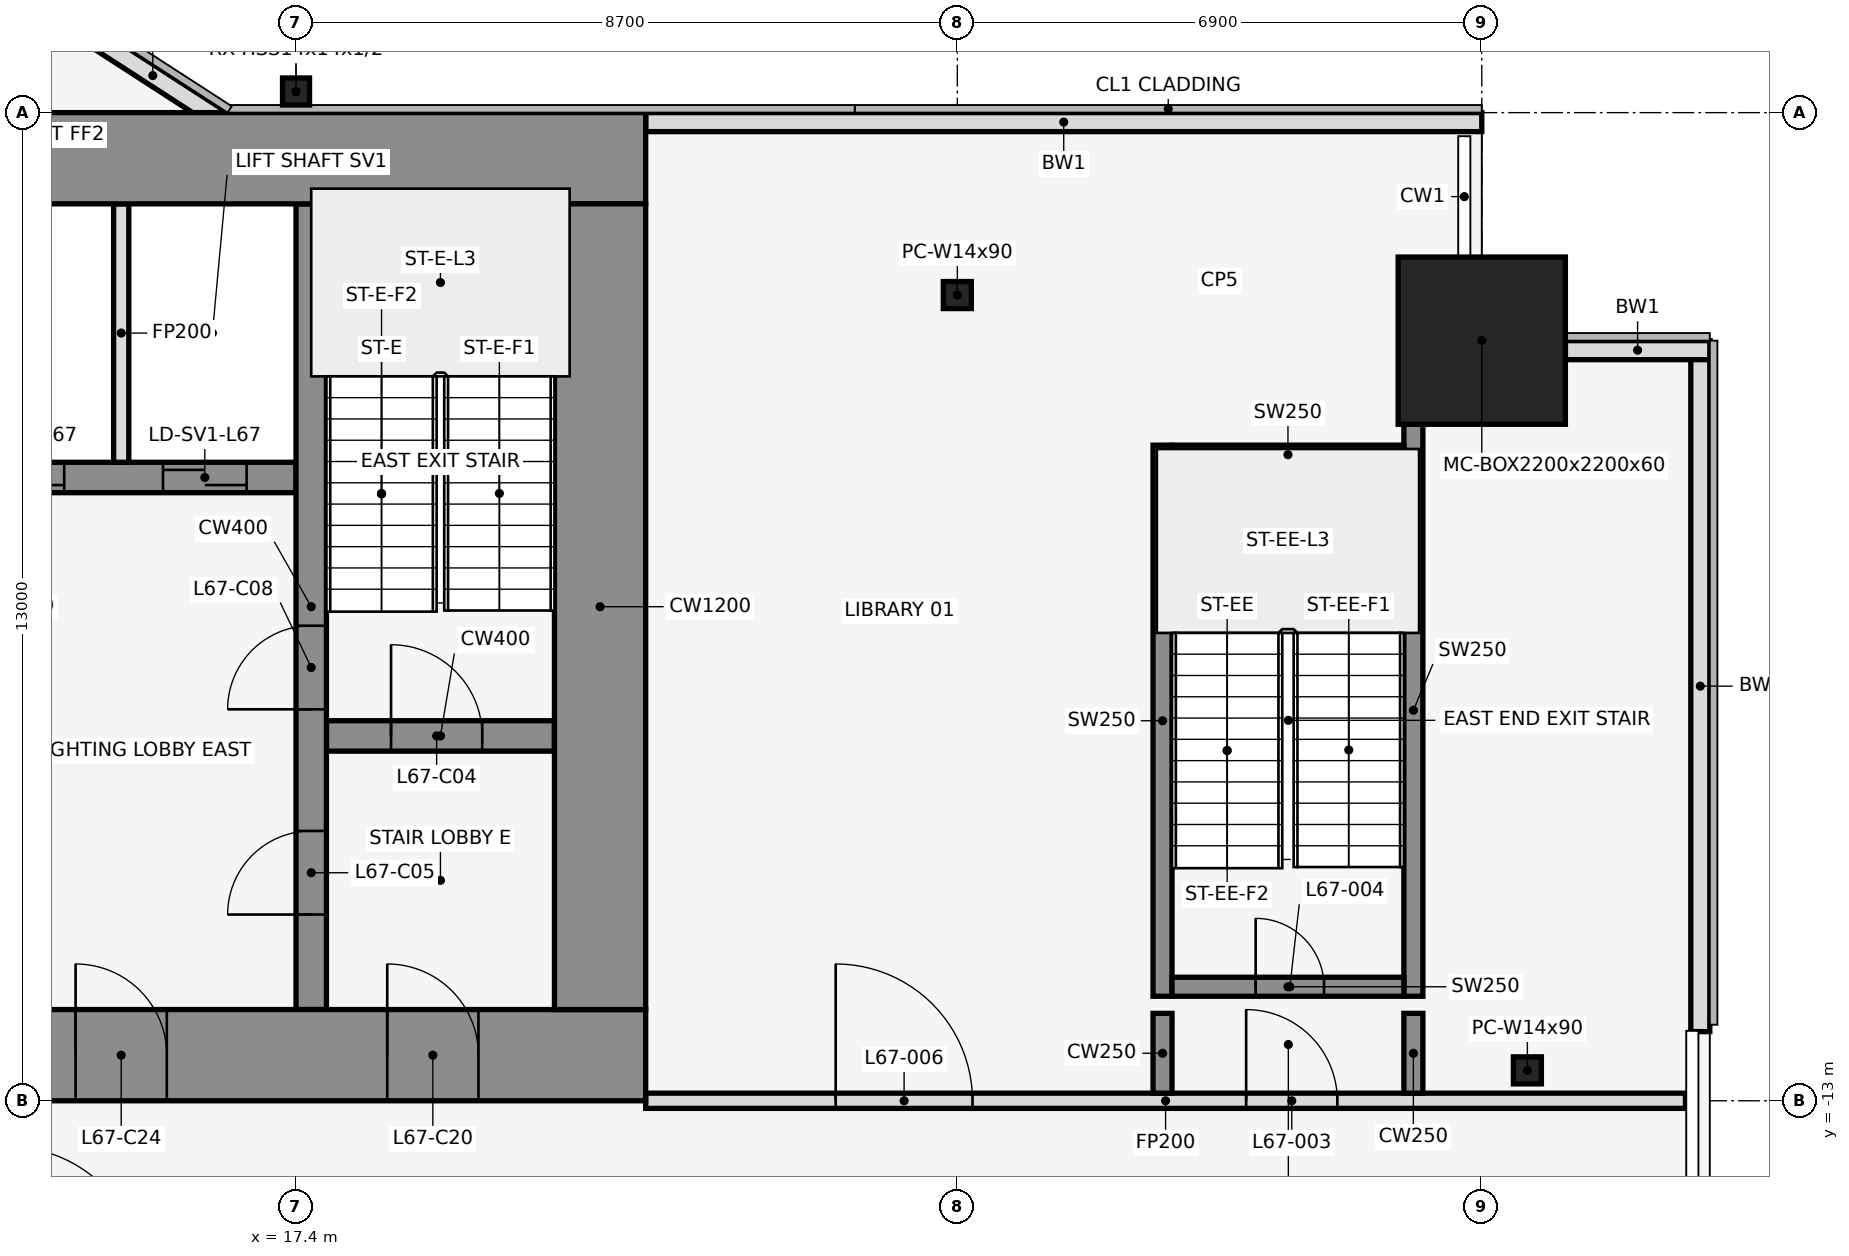
"""IFC4 building model, lengths in metres.
Left out: names, types, materials, properties, quantities, classifications, styles, units other than length and angle.
Written with IfcOpenShell. Run it as: python <this file> out.ifc"""

import sys

from ifc_helpers import new_model, si_unit, direction, frame, frame_2d, origin, origin_2d, place, context, subcontext, project, spatial, rectangle, hollow_rectangle, i_section, extrude, element, fill, save


model = new_model("IFC4")
c1 = context("Model", 3, precision=1e-05, world=origin(), true_north=direction((0.0, 1.0)))
c2 = subcontext(c1, "Body", "Model", "MODEL_VIEW")
j1 = project(units=[si_unit("LENGTHUNIT", "METRE"), si_unit("PLANEANGLEUNIT", "RADIAN")], contexts=[c1])
p1 = place(None, origin())
s1 = spatial("IfcSite", under=j1, at=p1, CompositionType="ELEMENT")
p2 = place(p1, origin())
s2 = spatial("IfcBuilding", under=s1, at=p2, CompositionType="ELEMENT")
p3 = place(p2, frame((0.0, 0.0, 297.5)))
s3 = spatial("IfcBuildingStorey", under=s2, at=p3, CompositionType="ELEMENT", Elevation=297.5)
p4 = place(p3, frame((26.1, -2.4, 0.0), z_axis=(0.0, 0.0, 1.0), x_axis=(1.0, 0.0, 0.0)))
e1 = element("IfcColumn", 1, at=p4, inside=s3, PredefinedType="COLUMN", context=c2, shape_type="SweptSolid", body=[
    extrude(i_section(OverallWidth=0.368, OverallDepth=0.356, WebThickness=0.011, FlangeThickness=0.018, at=origin_2d()), origin(), (0.0, 0.0, 1.0), 4.5),
])
p5 = place(p3, frame((33.0, -3.0, 0.0), z_axis=(0.0, 0.0, 1.0), x_axis=(1.0, 0.0, 0.0)))
e2 = element("IfcColumn", 2, at=p5, inside=s3, PredefinedType="COLUMN", context=c2, shape_type="SweptSolid", body=[
    extrude(hollow_rectangle(XDim=2.2, YDim=2.2, WallThickness=0.06, at=origin_2d()), origin(), (0.0, 0.0, 1.0), 4.5),
])
p6 = place(p3, frame((17.4, 0.278, 0.0), z_axis=(0.0, 0.0, 1.0), x_axis=(1.0, 0.0, 0.0)))
e3 = element("IfcColumn", 3, at=p6, inside=s3, PredefinedType="COLUMN", context=c2, shape_type="SweptSolid", body=[
    extrude(hollow_rectangle(XDim=0.356, YDim=0.356, WallThickness=0.012, at=origin_2d()), origin(), (0.0, 0.0, 1.0), 4.5),
])
p7 = place(p3, frame((33.6, -12.6, 0.0), z_axis=(0.0, 0.0, 1.0), x_axis=(1.0, 0.0, 0.0)))
e4 = element("IfcColumn", 4, at=p7, inside=s3, PredefinedType="COLUMN", context=c2, shape_type="SweptSolid", body=[
    extrude(i_section(OverallWidth=0.368, OverallDepth=0.356, WebThickness=0.011, FlangeThickness=0.018, at=origin_2d()), origin(), (0.0, 0.0, 1.0), 4.5),
])
p8 = place(p3, frame((33.0, -0.125, 0.0), z_axis=(0.0, 0.0, 1.0), x_axis=(-1.0, 0.0, 0.0)))
e5 = element("IfcWall", 5, at=p8, inside=s3, PredefinedType="STANDARD", context=c2, shape_type="SweptSolid", body=[
    extrude(rectangle(XDim=11.0, YDim=0.25, at=frame_2d((5.5, 0.0))), origin(), (0.0, 0.0, 1.0), 4.35),
])
p9 = place(p3, frame((16.432, -0.105, 0.0), z_axis=(0.0, 0.0, 1.0), x_axis=(-0.83981312244, 0.542875602121, 0.0)))
e6 = element("IfcWall", 6, at=p9, inside=s3, PredefinedType="STANDARD", context=c2, shape_type="SweptSolid", body=[
    extrude(rectangle(XDim=2.183, YDim=0.25, at=frame_2d((1.091, 0.0))), origin(), (0.0, 0.0, 1.0), 4.35),
])
p10 = place(p3, frame((35.875, -12.09, 0.0), z_axis=(0.0, 0.0, 1.0), x_axis=(0.0, 1.0, 0.0)))
e7 = element("IfcWall", 7, at=p10, inside=s3, PredefinedType="STANDARD", context=c2, shape_type="SweptSolid", body=[
    extrude(rectangle(XDim=9.09, YDim=0.25, at=frame_2d((4.545, 0.0))), origin(), (0.0, 0.0, 1.0), 4.35),
])
p11 = place(p3, frame((36.0, -3.125, 0.0), z_axis=(0.0, 0.0, 1.0), x_axis=(-1.0, 0.0, 0.0)))
e8 = element("IfcWall", 8, at=p11, inside=s3, PredefinedType="STANDARD", context=c2, shape_type="SweptSolid", body=[
    extrude(rectangle(XDim=1.9, YDim=0.25, at=frame_2d((0.95, 0.0))), origin(), (0.0, 0.0, 1.0), 4.35),
])
p12 = place(p3, frame((28.8, -11.625, 0.0), z_axis=(0.0, 0.0, 1.0), x_axis=(0.0, 1.0, 0.0)))
e9 = element("IfcWall", 9, at=p12, inside=s3, PredefinedType="SHEAR", context=c2, shape_type="SweptSolid", body=[
    extrude(rectangle(XDim=7.25, YDim=0.25, at=frame_2d((3.625, 0.0))), origin(), (0.0, 0.0, 1.0), 4.5),
])
p13 = place(p3, frame((32.1, -11.625, 0.0), z_axis=(0.0, 0.0, 1.0), x_axis=(0.0, 1.0, 0.0)))
e10 = element("IfcWall", 10, at=p13, inside=s3, PredefinedType="SHEAR", context=c2, shape_type="SweptSolid", body=[
    extrude(rectangle(XDim=7.525, YDim=0.25, at=frame_2d((3.762, 0.0))), origin(), (0.0, 0.0, 1.0), 4.5),
])
p14 = place(p3, frame((28.925, -11.5, 0.0), z_axis=(0.0, 0.0, 1.0), x_axis=(1.0, 0.0, 0.0)))
e11 = element("IfcWall", 11, at=p14, inside=s3, PredefinedType="SHEAR", context=c2, shape_type="SweptSolid", body=[
    extrude(rectangle(XDim=3.05, YDim=0.25, at=frame_2d((1.525, 0.0))), origin(), (0.0, 0.0, 1.0), 4.5),
])
p15 = place(p14, frame((1.1, 0.0, 0.0)))
e12 = element("IfcOpeningElement", 12, at=p15, cuts=e11, PredefinedType="OPENING", context=c2, shape_type="SweptSolid", body=[
    extrude(rectangle(XDim=0.9, YDim=2.1, at=frame_2d((0.45, 1.05))), frame((0.0, 0.137, 0.0), z_axis=(0.0, -1.0, 0.0), x_axis=(1.0, 0.0, 0.0)), (0.0, 0.0, 1.0), 0.274),
])
p16 = place(p3, frame((28.925, -4.5, 0.0), z_axis=(0.0, 0.0, 1.0), x_axis=(1.0, 0.0, 0.0)))
e13 = element("IfcWall", 13, at=p16, inside=s3, PredefinedType="SHEAR", context=c2, shape_type="SweptSolid", body=[
    extrude(rectangle(XDim=3.05, YDim=0.25, at=frame_2d((1.525, 0.0))), origin(), (0.0, 0.0, 1.0), 4.5),
])
p17 = place(p3, frame((22.0, -13.0, 0.0), z_axis=(0.0, 0.0, 1.0), x_axis=(1.0, 0.0, 0.0)))
e14 = element("IfcWall", 14, at=p17, inside=s3, PredefinedType="PARTITIONING", context=c2, shape_type="SweptSolid", body=[
    extrude(rectangle(XDim=13.68, YDim=0.2, at=frame_2d((6.84, 0.0))), origin(), (0.0, 0.0, 1.0), 3.418),
])
p18 = place(p17, frame((7.9, 0.0, 0.0)))
e15 = element("IfcOpeningElement", 15, at=p18, cuts=e14, PredefinedType="OPENING", context=c2, shape_type="SweptSolid", body=[
    extrude(rectangle(XDim=1.2, YDim=2.1, at=frame_2d((0.6, 1.05))), frame((0.0, 0.112, 0.0), z_axis=(0.0, -1.0, 0.0), x_axis=(1.0, 0.0, 0.0)), (0.0, 0.0, 1.0), 0.224),
])
p19 = place(p17, frame((2.5, 0.0, 0.0)))
e16 = element("IfcOpeningElement", 16, at=p19, cuts=e14, PredefinedType="OPENING", context=c2, shape_type="SweptSolid", body=[
    extrude(rectangle(XDim=1.8, YDim=2.1, at=frame_2d((0.9, 1.05))), frame((0.0, 0.112, 0.0), z_axis=(0.0, -1.0, 0.0), x_axis=(1.0, 0.0, 0.0)), (0.0, 0.0, 1.0), 0.224),
])
for number, where, z_axis, x_axis in (
    (17, (28.8, -12.9, 0.0), (0.0, 0.0, 1.0), (0.0, 1.0, 0.0)),
    (18, (32.1, -12.9, 0.0), (0.0, 0.0, 1.0), (0.0, 1.0, 0.0)),
):
    element("IfcWall", number, at=place(p3, frame(where, z_axis=z_axis, x_axis=x_axis)), inside=s3, PredefinedType="SHEAR", context=c2, shape_type="SweptSolid", body=[
        extrude(rectangle(XDim=1.05, YDim=0.25, at=frame_2d((0.525, 0.0))), origin(), (0.0, 0.0, 1.0), 4.5),
    ])
p20 = place(p3, frame((17.8, -8.2, 0.0), z_axis=(0.0, 0.0, 1.0), x_axis=(1.0, 0.0, 0.0)))
e19 = element("IfcWall", 19, at=p20, inside=s3, PredefinedType="SHEAR", context=c2, shape_type="SweptSolid", body=[
    extrude(rectangle(XDim=3.0, YDim=0.4, at=frame_2d((1.5, 0.0))), origin(), (0.0, 0.0, 1.0), 4.5),
])
p21 = place(p20, frame((0.85, 0.0, 0.0)))
e20 = element("IfcOpeningElement", 20, at=p21, cuts=e19, PredefinedType="OPENING", context=c2, shape_type="SweptSolid", body=[
    extrude(rectangle(XDim=1.2, YDim=2.1, at=frame_2d((0.6, 1.05))), frame((0.0, 0.212, 0.0), z_axis=(0.0, -1.0, 0.0), x_axis=(1.0, 0.0, 0.0)), (0.0, 0.0, 1.0), 0.424),
])
p22 = place(p3, frame((3.8, -4.8, 0.0), z_axis=(0.0, 0.0, 1.0), x_axis=(1.0, 0.0, 0.0)))
e21 = element("IfcWall", 21, at=p22, inside=s3, PredefinedType="SHEAR", context=c2, shape_type="SweptSolid", body=[
    extrude(rectangle(XDim=13.6, YDim=0.4, at=frame_2d((6.8, 0.0))), origin(), (0.0, 0.0, 1.0), 4.5),
])
p23 = place(p22, frame((0.75, 0.0, 0.0)))
e22 = element("IfcOpeningElement", 22, at=p23, cuts=e21, PredefinedType="OPENING", context=c2, shape_type="SweptSolid", body=[
    extrude(rectangle(XDim=1.2, YDim=2.1, at=frame_2d((0.6, 1.05))), frame((0.0, 0.212, 0.0), z_axis=(0.0, -1.0, 0.0), x_axis=(1.0, 0.0, 0.0)), (0.0, 0.0, 1.0), 0.424),
])
p24 = place(p22, frame((3.65, 0.0, 0.0)))
e23 = element("IfcOpeningElement", 23, at=p24, cuts=e21, PredefinedType="OPENING", context=c2, shape_type="SweptSolid", body=[
    extrude(rectangle(XDim=1.2, YDim=2.1, at=frame_2d((0.6, 1.05))), frame((0.0, 0.212, 0.0), z_axis=(0.0, -1.0, 0.0), x_axis=(1.0, 0.0, 0.0)), (0.0, 0.0, 1.0), 0.424),
])
p25 = place(p22, frame((6.65, 0.0, 0.0)))
e24 = element("IfcOpeningElement", 24, at=p25, cuts=e21, PredefinedType="OPENING", context=c2, shape_type="SweptSolid", body=[
    extrude(rectangle(XDim=1.2, YDim=2.1, at=frame_2d((0.6, 1.05))), frame((0.0, 0.212, 0.0), z_axis=(0.0, -1.0, 0.0), x_axis=(1.0, 0.0, 0.0)), (0.0, 0.0, 1.0), 0.424),
])
p26 = place(p22, frame((9.45, 0.0, 0.0)))
e25 = element("IfcOpeningElement", 25, at=p26, cuts=e21, PredefinedType="OPENING", context=c2, shape_type="SweptSolid", body=[
    extrude(rectangle(XDim=1.1, YDim=2.1, at=frame_2d((0.55, 1.05))), frame((0.0, 0.212, 0.0), z_axis=(0.0, -1.0, 0.0), x_axis=(1.0, 0.0, 0.0)), (0.0, 0.0, 1.0), 0.424),
])
p27 = place(p22, frame((11.85, 0.0, 0.0)))
e26 = element("IfcOpeningElement", 26, at=p27, cuts=e21, PredefinedType="OPENING", context=c2, shape_type="SweptSolid", body=[
    extrude(rectangle(XDim=1.1, YDim=2.1, at=frame_2d((0.55, 1.05))), frame((0.0, 0.212, 0.0), z_axis=(0.0, -1.0, 0.0), x_axis=(1.0, 0.0, 0.0)), (0.0, 0.0, 1.0), 0.424),
])
p28 = place(p3, frame((15.1, -4.6, 0.0), z_axis=(0.0, 0.0, 1.0), x_axis=(0.0, 1.0, 0.0)))
e27 = element("IfcWall", 27, at=p28, inside=s3, PredefinedType="PARTITIONING", context=c2, shape_type="SweptSolid", body=[
    extrude(rectangle(XDim=3.4, YDim=0.2, at=frame_2d((1.7, 0.0))), origin(), (0.0, 0.0, 1.0), 3.418),
])
p29 = place(p3, frame((17.6, -11.8, 0.0), z_axis=(0.0, 0.0, 1.0), x_axis=(0.0, 1.0, 0.0)))
e28 = element("IfcWall", 28, at=p29, inside=s3, PredefinedType="SHEAR", context=c2, shape_type="SweptSolid", body=[
    extrude(rectangle(XDim=10.6, YDim=0.4, at=frame_2d((5.3, 0.0))), origin(), (0.0, 0.0, 1.0), 4.5),
])
p30 = place(p29, frame((1.25, 0.0, 0.0)))
e29 = element("IfcOpeningElement", 29, at=p30, cuts=e28, PredefinedType="OPENING", context=c2, shape_type="SweptSolid", body=[
    extrude(rectangle(XDim=1.1, YDim=2.1, at=frame_2d((0.55, 1.05))), frame((0.0, 0.212, 0.0), z_axis=(0.0, -1.0, 0.0), x_axis=(1.0, 0.0, 0.0)), (0.0, 0.0, 1.0), 0.424),
])
p31 = place(p29, frame((3.95, 0.0, 0.0)))
e30 = element("IfcOpeningElement", 30, at=p31, cuts=e28, PredefinedType="OPENING", context=c2, shape_type="SweptSolid", body=[
    extrude(rectangle(XDim=1.1, YDim=2.1, at=frame_2d((0.55, 1.05))), frame((0.0, 0.212, 0.0), z_axis=(0.0, -1.0, 0.0), x_axis=(1.0, 0.0, 0.0)), (0.0, 0.0, 1.0), 0.424),
])
p32 = place(p3, frame((-22.0, -0.6, 0.0), z_axis=(0.0, 0.0, 1.0), x_axis=(1.0, 0.0, 0.0)))
e31 = element("IfcWall", 31, at=p32, inside=s3, PredefinedType="SHEAR", context=c2, shape_type="SweptSolid", body=[
    extrude(rectangle(XDim=44.0, YDim=1.2, at=frame_2d((22.0, 0.0))), origin(), (0.0, 0.0, 1.0), 4.5),
])
p33 = place(p32, frame((18.55, 0.0, 0.0)))
e32 = element("IfcOpeningElement", 32, at=p33, cuts=e31, PredefinedType="OPENING", context=c2, shape_type="SweptSolid", body=[
    extrude(rectangle(XDim=0.9, YDim=2.1, at=frame_2d((0.45, 1.05))), frame((0.0, 0.612, 0.0), z_axis=(0.0, -1.0, 0.0), x_axis=(1.0, 0.0, 0.0)), (0.0, 0.0, 1.0), 1.224),
])
p34 = place(p32, frame((24.55, 0.0, 0.0)))
e33 = element("IfcOpeningElement", 33, at=p34, cuts=e31, PredefinedType="OPENING", context=c2, shape_type="SweptSolid", body=[
    extrude(rectangle(XDim=0.9, YDim=2.1, at=frame_2d((0.45, 1.05))), frame((0.0, 0.612, 0.0), z_axis=(0.0, -1.0, 0.0), x_axis=(1.0, 0.0, 0.0)), (0.0, 0.0, 1.0), 1.224),
])
p35 = place(p3, frame((-22.0, -12.4, 0.0), z_axis=(0.0, 0.0, 1.0), x_axis=(1.0, 0.0, 0.0)))
e34 = element("IfcWall", 34, at=p35, inside=s3, PredefinedType="SHEAR", context=c2, shape_type="SweptSolid", body=[
    extrude(rectangle(XDim=44.0, YDim=1.2, at=frame_2d((22.0, 0.0))), origin(), (0.0, 0.0, 1.0), 4.5),
])
p36 = place(p35, frame((2.2, 0.0, 0.0)))
e35 = element("IfcOpeningElement", 35, at=p36, cuts=e34, PredefinedType="OPENING", context=c2, shape_type="SweptSolid", body=[
    extrude(rectangle(XDim=1.2, YDim=2.1, at=frame_2d((0.6, 1.05))), frame((0.0, 0.612, 0.0), z_axis=(0.0, -1.0, 0.0), x_axis=(1.0, 0.0, 0.0)), (0.0, 0.0, 1.0), 1.224),
])
p37 = place(p35, frame((21.4, 0.0, 0.0)))
e36 = element("IfcOpeningElement", 36, at=p37, cuts=e34, PredefinedType="OPENING", context=c2, shape_type="SweptSolid", body=[
    extrude(rectangle(XDim=1.2, YDim=2.1, at=frame_2d((0.6, 1.05))), frame((0.0, 0.612, 0.0), z_axis=(0.0, -1.0, 0.0), x_axis=(1.0, 0.0, 0.0)), (0.0, 0.0, 1.0), 1.224),
])
p38 = place(p35, frame((40.6, 0.0, 0.0)))
e37 = element("IfcOpeningElement", 37, at=p38, cuts=e34, PredefinedType="OPENING", context=c2, shape_type="SweptSolid", body=[
    extrude(rectangle(XDim=1.2, YDim=2.1, at=frame_2d((0.6, 1.05))), frame((0.0, 0.612, 0.0), z_axis=(0.0, -1.0, 0.0), x_axis=(1.0, 0.0, 0.0)), (0.0, 0.0, 1.0), 1.224),
])
p39 = place(p35, frame((16.0, 0.0, 0.0)))
e38 = element("IfcOpeningElement", 38, at=p39, cuts=e34, PredefinedType="OPENING", context=c2, shape_type="SweptSolid", body=[
    extrude(rectangle(XDim=1.8, YDim=2.1, at=frame_2d((0.9, 1.05))), frame((0.0, 0.612, 0.0), z_axis=(0.0, -1.0, 0.0), x_axis=(1.0, 0.0, 0.0)), (0.0, 0.0, 1.0), 1.224),
])
p40 = place(p35, frame((6.3, 0.0, 0.0)))
e39 = element("IfcOpeningElement", 39, at=p40, cuts=e34, PredefinedType="OPENING", context=c2, shape_type="SweptSolid", body=[
    extrude(rectangle(XDim=1.2, YDim=2.1, at=frame_2d((0.6, 1.05))), frame((0.0, 0.612, 0.0), z_axis=(0.0, -1.0, 0.0), x_axis=(1.0, 0.0, 0.0)), (0.0, 0.0, 1.0), 1.224),
])
p41 = place(p35, frame((26.2, 0.0, 0.0)))
e40 = element("IfcOpeningElement", 40, at=p41, cuts=e34, PredefinedType="OPENING", context=c2, shape_type="SweptSolid", body=[
    extrude(rectangle(XDim=1.8, YDim=2.1, at=frame_2d((0.9, 1.05))), frame((0.0, 0.612, 0.0), z_axis=(0.0, -1.0, 0.0), x_axis=(1.0, 0.0, 0.0)), (0.0, 0.0, 1.0), 1.224),
])
p42 = place(p35, frame((36.5, 0.0, 0.0)))
e41 = element("IfcOpeningElement", 41, at=p42, cuts=e34, PredefinedType="OPENING", context=c2, shape_type="SweptSolid", body=[
    extrude(rectangle(XDim=1.2, YDim=2.1, at=frame_2d((0.6, 1.05))), frame((0.0, 0.612, 0.0), z_axis=(0.0, -1.0, 0.0), x_axis=(1.0, 0.0, 0.0)), (0.0, 0.0, 1.0), 1.224),
])
p43 = place(p3, frame((21.4, -11.8, 0.0), z_axis=(0.0, 0.0, 1.0), x_axis=(0.0, 1.0, 0.0)))
e42 = element("IfcWall", 42, at=p43, inside=s3, PredefinedType="SHEAR", context=c2, shape_type="SweptSolid", body=[
    extrude(rectangle(XDim=10.6, YDim=1.2, at=frame_2d((5.3, 0.0))), origin(), (0.0, 0.0, 1.0), 4.5),
])
p44 = place(p18, origin())
e43 = element("IfcDoor", 43, at=p44, inside=s3, OperationType="SINGLE_SWING_RIGHT", PredefinedType="DOOR", context=c2, shape_type="SweptSolid", body=[
    extrude(rectangle(XDim=1.2, YDim=2.1, at=frame_2d((0.6, 1.05))), frame((0.0, 0.025, 0.0), z_axis=(0.0, -1.0, 0.0), x_axis=(1.0, 0.0, 0.0)), (0.0, 0.0, 1.0), 0.05),
])
fill(e15, e43)
p45 = place(p15, origin())
e44 = element("IfcDoor", 44, at=p45, inside=s3, OperationType="SINGLE_SWING_LEFT", PredefinedType="DOOR", context=c2, shape_type="SweptSolid", body=[
    extrude(rectangle(XDim=0.9, YDim=2.1, at=frame_2d((0.45, 1.05))), frame((0.0, 0.025, 0.0), z_axis=(0.0, -1.0, 0.0), x_axis=(1.0, 0.0, 0.0)), (0.0, 0.0, 1.0), 0.05),
])
fill(e12, e44)
p46 = place(p19, origin())
e45 = element("IfcDoor", 45, at=p46, inside=s3, OperationType="SINGLE_SWING_LEFT", PredefinedType="DOOR", context=c2, shape_type="SweptSolid", body=[
    extrude(rectangle(XDim=1.8, YDim=2.1, at=frame_2d((0.9, 1.05))), frame((0.0, 0.025, 0.0), z_axis=(0.0, -1.0, 0.0), x_axis=(1.0, 0.0, 0.0)), (0.0, 0.0, 1.0), 0.05),
])
fill(e16, e45)
p47 = place(p21, origin())
e46 = element("IfcDoor", 46, at=p47, inside=s3, OperationType="SINGLE_SWING_RIGHT", PredefinedType="DOOR", context=c2, shape_type="SweptSolid", body=[
    extrude(rectangle(XDim=1.2, YDim=2.1, at=frame_2d((0.6, 1.05))), frame((0.0, 0.025, 0.0), z_axis=(0.0, -1.0, 0.0), x_axis=(1.0, 0.0, 0.0)), (0.0, 0.0, 1.0), 0.05),
])
fill(e20, e46)
p48 = place(p30, origin())
e47 = element("IfcDoor", 47, at=p48, inside=s3, OperationType="SINGLE_SWING_LEFT", PredefinedType="DOOR", context=c2, shape_type="SweptSolid", body=[
    extrude(rectangle(XDim=1.1, YDim=2.1, at=frame_2d((0.55, 1.05))), frame((0.0, 0.025, 0.0), z_axis=(0.0, -1.0, 0.0), x_axis=(1.0, 0.0, 0.0)), (0.0, 0.0, 1.0), 0.05),
])
fill(e29, e47)
p49 = place(p26, origin())
e48 = element("IfcDoor", 48, at=p49, inside=s3, OperationType="DOUBLE_DOOR_SLIDING", PredefinedType="DOOR", context=c2, shape_type="SweptSolid", body=[
    extrude(rectangle(XDim=1.1, YDim=2.1, at=frame_2d((0.55, 1.05))), frame((0.0, 0.025, 0.0), z_axis=(0.0, -1.0, 0.0), x_axis=(1.0, 0.0, 0.0)), (0.0, 0.0, 1.0), 0.05),
])
fill(e25, e48)
p50 = place(p27, origin())
e49 = element("IfcDoor", 49, at=p50, inside=s3, OperationType="DOUBLE_DOOR_SLIDING", PredefinedType="DOOR", context=c2, shape_type="SweptSolid", body=[
    extrude(rectangle(XDim=1.1, YDim=2.1, at=frame_2d((0.55, 1.05))), frame((0.0, 0.025, 0.0), z_axis=(0.0, -1.0, 0.0), x_axis=(1.0, 0.0, 0.0)), (0.0, 0.0, 1.0), 0.05),
])
fill(e26, e49)
p51 = place(p31, origin())
e50 = element("IfcDoor", 50, at=p51, inside=s3, OperationType="SINGLE_SWING_RIGHT", PredefinedType="DOOR", context=c2, shape_type="SweptSolid", body=[
    extrude(rectangle(XDim=1.1, YDim=2.1, at=frame_2d((0.55, 1.05))), frame((0.0, 0.025, 0.0), z_axis=(0.0, -1.0, 0.0), x_axis=(1.0, 0.0, 0.0)), (0.0, 0.0, 1.0), 0.05),
])
fill(e30, e50)
p52 = place(p38, frame((1.2, 0.0, 0.0), z_axis=(0.0, 0.0, 1.0), x_axis=(-1.0, 0.0, 0.0)))
e51 = element("IfcDoor", 51, at=p52, inside=s3, OperationType="SINGLE_SWING_RIGHT", PredefinedType="DOOR", context=c2, shape_type="SweptSolid", body=[
    extrude(rectangle(XDim=1.2, YDim=2.1, at=frame_2d((0.6, 1.05))), frame((0.0, 0.025, 0.0), z_axis=(0.0, -1.0, 0.0), x_axis=(1.0, 0.0, 0.0)), (0.0, 0.0, 1.0), 0.05),
])
fill(e37, e51)
p53 = place(p42, frame((1.2, 0.0, 0.0), z_axis=(0.0, 0.0, 1.0), x_axis=(-1.0, 0.0, 0.0)))
e52 = element("IfcDoor", 52, at=p53, inside=s3, OperationType="SINGLE_SWING_RIGHT", PredefinedType="DOOR", context=c2, shape_type="SweptSolid", body=[
    extrude(rectangle(XDim=1.2, YDim=2.1, at=frame_2d((0.6, 1.05))), frame((0.0, 0.025, 0.0), z_axis=(0.0, -1.0, 0.0), x_axis=(1.0, 0.0, 0.0)), (0.0, 0.0, 1.0), 0.05),
])
fill(e41, e52)
save(model, sys.argv[1])
